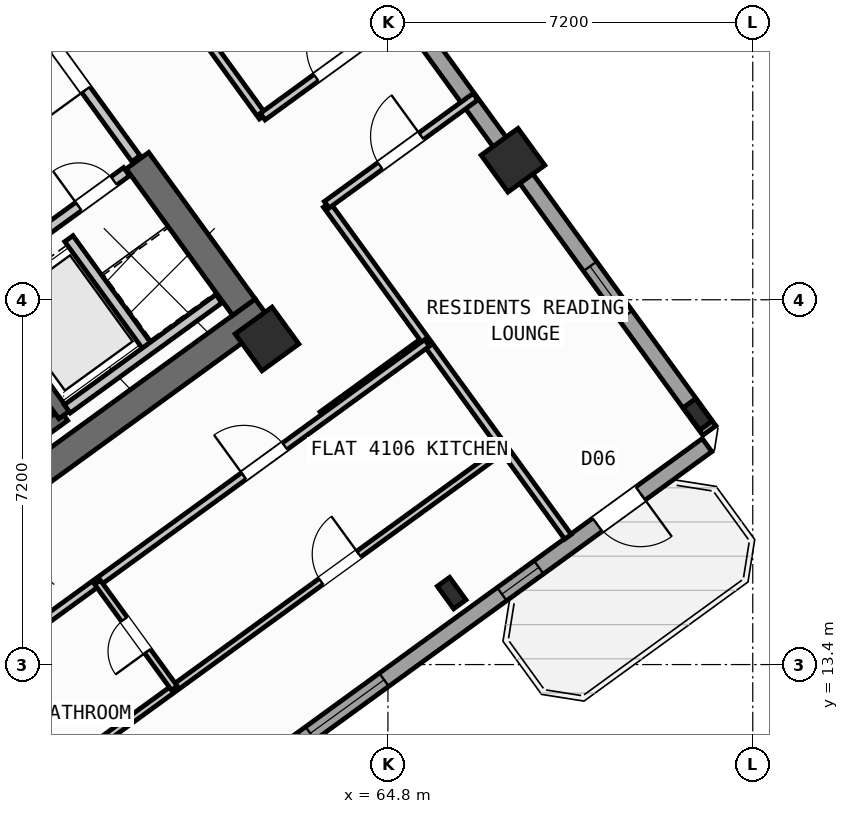
"""IFC4 building model, lengths in metres.
Left out: names, types, materials, properties, quantities, classifications, styles, units other than length and angle.
Written with IfcOpenShell. Run it as: python <this file> out.ifc"""

import sys

from ifc_helpers import new_model, si_unit, direction, frame, frame_2d, origin, origin_2d, place, context, subcontext, project, spatial, rectangle, hollow_rectangle, i_section, extrude, source, transform, mapped, element, fill, save


model = new_model("IFC4")
c1 = context("Model", 3, precision=1e-05, world=origin(), true_north=direction((0.0, 1.0)))
c2 = subcontext(c1, "Body", "Model", "MODEL_VIEW")
j1 = project(units=[si_unit("LENGTHUNIT", "METRE"), si_unit("PLANEANGLEUNIT", "RADIAN")], contexts=[c1])
p1 = place(None, origin())
s1 = spatial("IfcSite", under=j1, at=p1, CompositionType="ELEMENT")
p2 = place(p1, origin())
s2 = spatial("IfcBuilding", under=s1, at=p2, CompositionType="ELEMENT")
p3 = place(p2, frame((0.0, 0.0, 162.3)))
s3 = spatial("IfcBuildingStorey", under=s2, at=p3, CompositionType="ELEMENT", Elevation=162.3)
p4 = place(p3, frame((52.359, 13.14, 0.0), z_axis=(0.0, 0.0, 1.0), x_axis=(0.809014896919, 0.587788139183, 0.0)))
e1 = element("IfcWall", 1, at=p4, inside=s3, PredefinedType="SHEAR", context=c2, shape_type="SweptSolid", body=[
    extrude(rectangle(XDim=12.34, YDim=0.55, at=frame_2d((6.17, 0.0))), origin(), (0.0, 0.0, 1.0), 3.35),
])
p5 = place(p3, frame((61.958, 20.454, 0.0), z_axis=(0.0, 0.0, 1.0), x_axis=(-0.587802113096, 0.809004744015, 0.0)))
e2 = element("IfcWall", 2, at=p5, inside=s3, PredefinedType="SHEAR", context=c2, shape_type="SweptSolid", body=[
    extrude(rectangle(XDim=3.575, YDim=0.55, at=frame_2d((1.788, 0.0))), origin(), (0.0, 0.0, 1.0), 3.35),
])
m1 = source(origin(), c2, "Body", "SweptSolid", [
    extrude(i_section(OverallWidth=0.3, OverallDepth=0.55, WebThickness=0.015, FlangeThickness=0.029, at=origin_2d()), origin(), (0.0, 0.0, 1.0), 3.6),
])
p6 = place(p3, frame((66.058, 14.811, 0.0), z_axis=(0.0, 0.0, 1.0), x_axis=(0.809016994375, 0.587785252292, 0.0)))
e3 = element("IfcColumn", 3, at=p6, inside=s3, PredefinedType="COLUMN", context=c2, shape_type="MappedRepresentation", body=[
    mapped(m1, transform((0.0, 0.0, 0.0), scale=1.0)),
])
m2 = source(origin(), c2, "Body", "SweptSolid", [
    extrude(hollow_rectangle(XDim=0.9, YDim=0.9, WallThickness=0.036, at=origin_2d()), origin(), (0.0, 0.0, 1.0), 3.6),
])
p7 = place(p3, frame((62.414, 19.827, 0.0), z_axis=(0.0, 0.0, 1.0), x_axis=(0.809016994375, 0.587785252292, 0.0)))
e4 = element("IfcColumn", 4, at=p7, inside=s3, PredefinedType="COLUMN", context=c2, shape_type="MappedRepresentation", body=[
    mapped(m2, transform((0.0, 0.0, 0.0), scale=1.0)),
])
p8 = place(p3, frame((70.912, 18.338, 0.0), z_axis=(0.0, 0.0, 1.0), x_axis=(0.809016994375, 0.587785252292, 0.0)))
e5 = element("IfcColumn", 5, at=p8, inside=s3, PredefinedType="COLUMN", context=c2, shape_type="MappedRepresentation", body=[
    mapped(m1, transform((0.0, 0.0, 0.0), scale=1.0)),
])
p9 = place(p3, frame((67.268, 23.354, 0.0), z_axis=(0.0, 0.0, 1.0), x_axis=(0.809016994375, 0.587785252292, 0.0)))
e6 = element("IfcColumn", 6, at=p9, inside=s3, PredefinedType="COLUMN", context=c2, shape_type="MappedRepresentation", body=[
    mapped(m2, transform((0.0, 0.0, 0.0), scale=1.0)),
])
p10 = place(p3, frame((43.938, 25.192, 0.0), z_axis=(0.0, 0.0, 1.0), x_axis=(0.809016324578, 0.587786174187, 0.0)))
e7 = element("IfcWall", 7, at=p10, inside=s3, PredefinedType="STANDARD", context=c2, shape_type="SweptSolid", body=[
    extrude(rectangle(XDim=17.587, YDim=0.32, at=frame_2d((8.794, 0.0))), origin(), (0.0, 0.0, 1.0), 3.35),
])
p11 = place(p10, frame((14.914, 0.0, 0.0)))
e8 = element("IfcOpeningElement", 8, at=p11, cuts=e7, PredefinedType="OPENING", context=c2, shape_type="SweptSolid", body=[
    extrude(rectangle(XDim=1.05, YDim=2.15, at=frame_2d((0.525, 1.075))), frame((0.0, 0.17, 0.0), z_axis=(0.0, -1.0, 0.0), x_axis=(1.0, 0.0, 0.0)), (0.0, 0.0, 1.0), 0.34),
])
p12 = place(p10, frame((2.144, 0.0, 0.8)))
e9 = element("IfcOpeningElement", 9, at=p12, cuts=e7, PredefinedType="OPENING", context=c2, shape_type="SweptSolid", body=[
    extrude(rectangle(XDim=2.1, YDim=1.55, at=frame_2d((1.05, 0.775))), frame((0.0, 0.17, 0.0), z_axis=(0.0, -1.0, 0.0), x_axis=(1.0, 0.0, 0.0)), (0.0, 0.0, 1.0), 0.34),
])
p13 = place(p10, frame((7.344, 0.0, 0.8)))
e10 = element("IfcOpeningElement", 10, at=p13, cuts=e7, PredefinedType="OPENING", context=c2, shape_type="SweptSolid", body=[
    extrude(rectangle(XDim=2.1, YDim=1.55, at=frame_2d((1.05, 0.775))), frame((0.0, 0.17, 0.0), z_axis=(0.0, -1.0, 0.0), x_axis=(1.0, 0.0, 0.0)), (0.0, 0.0, 1.0), 0.34),
])
p14 = place(p3, frame((58.455, 35.484, 0.0), z_axis=(0.0, 0.0, 1.0), x_axis=(0.587783625747, -0.809018176127, 0.0)))
e11 = element("IfcWall", 11, at=p14, inside=s3, PredefinedType="STANDARD", context=c2, shape_type="SweptSolid", body=[
    extrude(rectangle(XDim=21.587, YDim=0.32, at=frame_2d((10.794, 0.0))), origin(), (0.0, 0.0, 1.0), 2.775),
])
p15 = place(p14, frame((1.475, 0.0, 0.8)))
e12 = element("IfcOpeningElement", 12, at=p15, cuts=e11, PredefinedType="OPENING", context=c2, shape_type="SweptSolid", body=[
    extrude(rectangle(XDim=2.1, YDim=1.55, at=frame_2d((1.05, 0.775))), frame((0.0, 0.17, 0.0), z_axis=(0.0, -1.0, 0.0), x_axis=(1.0, 0.0, 0.0)), (0.0, 0.0, 1.0), 0.34),
])
p16 = place(p14, frame((5.13, 0.0, 0.85)))
e13 = element("IfcOpeningElement", 13, at=p16, cuts=e11, PredefinedType="OPENING", context=c2, shape_type="SweptSolid", body=[
    extrude(rectangle(XDim=1.5, YDim=1.5, at=frame_2d((0.75, 0.75))), frame((0.0, 0.17, 0.0), z_axis=(0.0, -1.0, 0.0), x_axis=(1.0, 0.0, 0.0)), (0.0, 0.0, 1.0), 0.34),
])
p17 = place(p14, frame((8.929, 0.0, 0.85)))
e14 = element("IfcOpeningElement", 14, at=p17, cuts=e11, PredefinedType="OPENING", context=c2, shape_type="SweptSolid", body=[
    extrude(rectangle(XDim=1.5, YDim=1.5, at=frame_2d((0.75, 0.75))), frame((0.0, 0.17, 0.0), z_axis=(0.0, -1.0, 0.0), x_axis=(1.0, 0.0, 0.0)), (0.0, 0.0, 1.0), 0.34),
])
p18 = place(p14, frame((17.581, 0.0, 0.95)))
e15 = element("IfcOpeningElement", 15, at=p18, cuts=e11, PredefinedType="OPENING", context=c2, shape_type="SweptSolid", body=[
    extrude(rectangle(XDim=1.2, YDim=1.4, at=frame_2d((0.6, 0.7))), frame((0.0, 0.17, 0.0), z_axis=(0.0, -1.0, 0.0), x_axis=(1.0, 0.0, 0.0)), (0.0, 0.0, 1.0), 0.34),
])
p19 = place(p3, frame((71.098, 17.731, 0.0), z_axis=(0.0, 0.0, 1.0), x_axis=(-0.809021120468, -0.587779573171, 0.0)))
e16 = element("IfcWall", 16, at=p19, inside=s3, PredefinedType="STANDARD", context=c2, shape_type="SweptSolid", body=[
    extrude(rectangle(XDim=17.588, YDim=0.32, at=frame_2d((8.794, 0.0))), origin(), (0.0, 0.0, 1.0), 3.35),
])
p20 = place(p19, frame((1.624, 0.0, 0.0)))
e17 = element("IfcOpeningElement", 17, at=p20, cuts=e16, PredefinedType="OPENING", context=c2, shape_type="SweptSolid", body=[
    extrude(rectangle(XDim=1.05, YDim=2.15, at=frame_2d((0.525, 1.075))), frame((0.0, 0.17, 0.0), z_axis=(0.0, -1.0, 0.0), x_axis=(1.0, 0.0, 0.0)), (0.0, 0.0, 1.0), 0.34),
])
p21 = place(p19, frame((4.104, 0.0, 1.0)))
e18 = element("IfcOpeningElement", 18, at=p21, cuts=e16, PredefinedType="OPENING", context=c2, shape_type="SweptSolid", body=[
    extrude(rectangle(XDim=0.9, YDim=1.25, at=frame_2d((0.45, 0.625))), frame((0.0, 0.17, 0.0), z_axis=(0.0, -1.0, 0.0), x_axis=(1.0, 0.0, 0.0)), (0.0, 0.0, 1.0), 0.34),
])
p22 = place(p19, frame((7.879, 0.0, 0.85)))
e19 = element("IfcOpeningElement", 19, at=p22, cuts=e16, PredefinedType="OPENING", context=c2, shape_type="SweptSolid", body=[
    extrude(rectangle(XDim=1.8, YDim=1.5, at=frame_2d((0.9, 0.75))), frame((0.0, 0.17, 0.0), z_axis=(0.0, -1.0, 0.0), x_axis=(1.0, 0.0, 0.0)), (0.0, 0.0, 1.0), 0.34),
])
p23 = place(p19, frame((12.849, 0.0, 0.85)))
e20 = element("IfcOpeningElement", 20, at=p23, cuts=e16, PredefinedType="OPENING", context=c2, shape_type="SweptSolid", body=[
    extrude(rectangle(XDim=1.8, YDim=1.5, at=frame_2d((0.9, 0.75))), frame((0.0, 0.17, 0.0), z_axis=(0.0, -1.0, 0.0), x_axis=(1.0, 0.0, 0.0)), (0.0, 0.0, 1.0), 0.34),
])
p24 = place(p3, frame((52.472, 14.013, 0.0), z_axis=(0.0, 0.0, 1.0), x_axis=(0.809028366311, 0.587769599847, 0.0)))
e21 = element("IfcWall", 21, at=p24, inside=s3, PredefinedType="SHEAR", context=c2, shape_type="SweptSolid", body=[
    extrude(rectangle(XDim=7.33, YDim=0.26, at=frame_2d((3.665, 0.0))), origin(), (0.0, 0.0, 1.0), 3.35),
])
p25 = place(p3, frame((58.41, 18.327, 0.0), z_axis=(0.0, 0.0, 1.0), x_axis=(-0.58776738483, 0.809029975545, 0.0)))
e22 = element("IfcWall", 22, at=p25, inside=s3, PredefinedType="SHEAR", context=c2, shape_type="SweptSolid", body=[
    extrude(rectangle(XDim=3.16, YDim=0.26, at=frame_2d((1.58, 0.0))), origin(), (0.0, 0.0, 1.0), 3.35),
])
p26 = place(p3, frame((56.553, 20.884, 0.0), z_axis=(0.0, 0.0, 1.0), x_axis=(0.809023564264, 0.58777620951, 0.0)))
e23 = element("IfcWall", 23, at=p26, inside=s3, PredefinedType="STANDARD", context=c2, shape_type="SweptSolid", body=[
    extrude(rectangle(XDim=3.818, YDim=0.2, at=frame_2d((1.909, 0.0))), origin(), (0.0, 0.0, 1.0), 3.34),
])
p27 = place(p26, frame((0.57, 0.0, 0.0)))
e24 = element("IfcOpeningElement", 24, at=p27, cuts=e23, PredefinedType="OPENING", context=c2, shape_type="SweptSolid", body=[
    extrude(rectangle(XDim=1.1, YDim=2.15, at=frame_2d((0.55, 1.075))), frame((0.0, 0.11, 0.0), z_axis=(0.0, -1.0, 0.0), x_axis=(1.0, 0.0, 0.0)), (0.0, 0.0, 1.0), 0.22),
])
p28 = place(p26, frame((2.65, 0.0, 0.0)))
e25 = element("IfcOpeningElement", 25, at=p28, cuts=e23, PredefinedType="OPENING", context=c2, shape_type="SweptSolid", body=[
    extrude(rectangle(XDim=0.86, YDim=2.05, at=frame_2d((0.43, 1.025))), frame((0.0, 0.11, 0.0), z_axis=(0.0, -1.0, 0.0), x_axis=(1.0, 0.0, 0.0)), (0.0, 0.0, 1.0), 0.22),
])
p29 = place(p3, frame((60.067, 19.655, 0.0), z_axis=(0.0, 0.0, 1.0), x_axis=(-0.587800520745, 0.809005900975, 0.0)))
e26 = element("IfcWall", 26, at=p29, inside=s3, PredefinedType="STANDARD", context=c2, shape_type="SweptSolid", body=[
    extrude(rectangle(XDim=2.66, YDim=0.2, at=frame_2d((1.33, 0.0))), origin(), (0.0, 0.0, 1.0), 3.34),
])
p30 = place(p3, frame((58.472, 18.447, 0.0), z_axis=(0.0, 0.0, 1.0), x_axis=(0.809018631237, 0.587782999339, 0.0)))
e27 = element("IfcWall", 27, at=p30, inside=s3, PredefinedType="STANDARD", context=c2, shape_type="SweptSolid", body=[
    extrude(rectangle(XDim=3.698, YDim=0.2, at=frame_2d((1.849, 0.0))), origin(), (0.0, 0.0, 1.0), 3.34),
])
p31 = place(p3, frame((59.827, 23.386, 0.0), z_axis=(0.0, 0.0, 1.0), x_axis=(-0.587803840107, 0.809003489211, 0.0)))
e28 = element("IfcWall", 28, at=p31, inside=s3, PredefinedType="STANDARD", context=c2, shape_type="SweptSolid", body=[
    extrude(rectangle(XDim=2.96, YDim=0.2, at=frame_2d((1.48, 0.0))), origin(), (0.0, 0.0, 1.0), 3.34),
])
p32 = place(p31, frame((1.68, 0.0, 0.0)))
e29 = element("IfcOpeningElement", 29, at=p32, cuts=e28, PredefinedType="OPENING", context=c2, shape_type="SweptSolid", body=[
    extrude(rectangle(XDim=1.0, YDim=2.1, at=frame_2d((0.5, 1.05))), frame((0.0, 0.11, 0.0), z_axis=(0.0, -1.0, 0.0), x_axis=(1.0, 0.0, 0.0)), (0.0, 0.0, 1.0), 0.22),
])
p33 = place(p3, frame((63.507, 18.322, 0.0), z_axis=(0.0, 0.0, 1.0), x_axis=(0.809034604122, 0.587761013791, 0.0)))
e30 = element("IfcWall", 30, at=p33, inside=s3, PredefinedType="PARTITIONING", context=c2, shape_type="SweptSolid", body=[
    extrude(rectangle(XDim=2.51, YDim=0.16, at=frame_2d((1.255, 0.0))), origin(), (0.0, 0.0, 1.0), 3.34),
])
p34 = place(p3, frame((68.353, 15.922, 0.0), z_axis=(0.0, 0.0, 1.0), x_axis=(-0.58776839458, 0.809029241952, 0.0)))
e31 = element("IfcWall", 31, at=p34, inside=s3, PredefinedType="PARTITIONING", context=c2, shape_type="SweptSolid", body=[
    extrude(rectangle(XDim=8.1, YDim=0.16, at=frame_2d((4.05, 0.0))), origin(), (0.0, 0.0, 1.0), 3.34),
])
p35 = place(p3, frame((62.328, 24.215, 0.0), z_axis=(0.0, 0.0, 1.0), x_axis=(-0.587778600963, 0.809021826807, 0.0)))
e32 = element("IfcWall", 32, at=p35, inside=s3, PredefinedType="PARTITIONING", context=c2, shape_type="SweptSolid", body=[
    extrude(rectangle(XDim=11.45, YDim=0.16, at=frame_2d((5.725, 0.0))), origin(), (0.0, 0.0, 1.0), 3.34),
])
p36 = place(p3, frame((63.592, 22.475, 0.0), z_axis=(0.0, 0.0, 1.0), x_axis=(0.809035546126, 0.58775971715, 0.0)))
e33 = element("IfcWall", 33, at=p36, inside=s3, PredefinedType="PARTITIONING", context=c2, shape_type="SweptSolid", body=[
    extrude(rectangle(XDim=3.63, YDim=0.16, at=frame_2d((1.815, 0.0))), origin(), (0.0, 0.0, 1.0), 3.34),
])
p37 = place(p36, frame((1.305, 0.0, 0.0)))
e34 = element("IfcOpeningElement", 34, at=p37, cuts=e33, PredefinedType="OPENING", context=c2, shape_type="SweptSolid", body=[
    extrude(rectangle(XDim=1.0, YDim=2.1, at=frame_2d((0.5, 1.05))), frame((0.0, 0.09, 0.0), z_axis=(0.0, -1.0, 0.0), x_axis=(1.0, 0.0, 0.0)), (0.0, 0.0, 1.0), 0.18),
])
p38 = place(p3, frame((62.328, 24.215, 0.0), z_axis=(0.0, 0.0, 1.0), x_axis=(0.809003564202, 0.587803736896, 0.0)))
e35 = element("IfcWall", 35, at=p38, inside=s3, PredefinedType="PARTITIONING", context=c2, shape_type="SweptSolid", body=[
    extrude(rectangle(XDim=3.63, YDim=0.16, at=frame_2d((1.815, 0.0))), origin(), (0.0, 0.0, 1.0), 3.34),
])
p39 = place(p38, frame((1.305, 0.0, 0.0)))
e36 = element("IfcOpeningElement", 36, at=p39, cuts=e35, PredefinedType="OPENING", context=c2, shape_type="SweptSolid", body=[
    extrude(rectangle(XDim=1.0, YDim=2.1, at=frame_2d((0.5, 1.05))), frame((0.0, 0.09, 0.0), z_axis=(0.0, -1.0, 0.0), x_axis=(1.0, 0.0, 0.0)), (0.0, 0.0, 1.0), 0.18),
])
p40 = place(p3, frame((53.705, 11.126, 0.0), z_axis=(0.0, 0.0, 1.0), x_axis=(0.809014504436, 0.587788679384, 0.0)))
e37 = element("IfcWall", 37, at=p40, inside=s3, PredefinedType="PARTITIONING", context=c2, shape_type="SweptSolid", body=[
    extrude(rectangle(XDim=14.67, YDim=0.16, at=frame_2d((7.335, 0.0))), origin(), (0.0, 0.0, 1.0), 3.34),
])
p41 = place(p40, frame((10.2, 0.0, 0.0)))
e38 = element("IfcOpeningElement", 38, at=p41, cuts=e37, PredefinedType="OPENING", context=c2, shape_type="SweptSolid", body=[
    extrude(rectangle(XDim=1.0, YDim=2.1, at=frame_2d((0.5, 1.05))), frame((0.0, 0.09, 0.0), z_axis=(0.0, -1.0, 0.0), x_axis=(1.0, 0.0, 0.0)), (0.0, 0.0, 1.0), 0.18),
])
p42 = place(p3, frame((56.249, 9.785, 0.0), z_axis=(0.0, 0.0, 1.0), x_axis=(0.809011747655, 0.587792473715, 0.0)))
e39 = element("IfcWall", 39, at=p42, inside=s3, PredefinedType="PLUMBINGWALL", context=c2, shape_type="SweptSolid", body=[
    extrude(rectangle(XDim=13.4, YDim=0.14, at=frame_2d((6.7, 0.0))), origin(), (0.0, 0.0, 1.0), 3.34),
])
p43 = place(p42, frame((8.94, 0.0, 0.0)))
e40 = element("IfcOpeningElement", 40, at=p43, cuts=e39, PredefinedType="OPENING", context=c2, shape_type="SweptSolid", body=[
    extrude(rectangle(XDim=0.92, YDim=2.08, at=frame_2d((0.46, 1.04))), frame((0.0, 0.08, 0.0), z_axis=(0.0, -1.0, 0.0), x_axis=(1.0, 0.0, 0.0)), (0.0, 0.0, 1.0), 0.16),
])
p44 = place(p3, frame((60.585, 12.936, 0.0), z_axis=(0.0, 0.0, 1.0), x_axis=(-0.587772116736, 0.809026537752, 0.0)))
e41 = element("IfcWall", 41, at=p44, inside=s3, PredefinedType="PLUMBINGWALL", context=c2, shape_type="SweptSolid", body=[
    extrude(rectangle(XDim=2.58, YDim=0.14, at=frame_2d((1.29, 0.0))), origin(), (0.0, 0.0, 1.0), 3.34),
])
p45 = place(p44, frame((0.9, 0.0, 0.0)))
e42 = element("IfcOpeningElement", 42, at=p45, cuts=e41, PredefinedType="OPENING", context=c2, shape_type="SweptSolid", body=[
    extrude(rectangle(XDim=0.78, YDim=2.05, at=frame_2d((0.39, 1.025))), frame((0.0, 0.08, 0.0), z_axis=(0.0, -1.0, 0.0), x_axis=(1.0, 0.0, 0.0)), (0.0, 0.0, 1.0), 0.16),
])
m3 = source(origin(), c2, "Body", "SweptSolid", [
    extrude(rectangle(XDim=1.05, YDim=2.15, at=frame_2d((0.525, 1.075))), frame((0.0, 0.025, 0.0), z_axis=(0.0, -1.0, 0.0), x_axis=(1.0, 0.0, 0.0)), (0.0, 0.0, 1.0), 0.05),
])
p46 = place(p20, origin())
e43 = element("IfcDoor", 43, at=p46, inside=s3, OperationType="SINGLE_SWING_LEFT", PredefinedType="DOOR", context=c2, shape_type="MappedRepresentation", body=[
    mapped(m3, transform((0.0, 0.0, 0.0), scale=1.0)),
])
fill(e17, e43)
m4 = source(origin(), c2, "Body", "SweptSolid", [
    extrude(rectangle(XDim=1.2, YDim=1.4, at=frame_2d((0.6, 0.7))), frame((0.0, 0.03, 0.0), z_axis=(0.0, -1.0, 0.0), x_axis=(1.0, 0.0, 0.0)), (0.0, 0.0, 1.0), 0.06),
])
p47 = place(p18, origin())
e44 = element("IfcWindow", 44, at=p47, inside=s3, PartitioningType="SINGLE_PANEL", PredefinedType="WINDOW", context=c2, shape_type="MappedRepresentation", body=[
    mapped(m4, transform((0.0, 0.0, 0.0), scale=1.0)),
])
fill(e15, e44)
m5 = source(origin(), c2, "Body", "SweptSolid", [
    extrude(rectangle(XDim=0.9, YDim=1.25, at=frame_2d((0.45, 0.625))), frame((0.0, 0.03, 0.0), z_axis=(0.0, -1.0, 0.0), x_axis=(1.0, 0.0, 0.0)), (0.0, 0.0, 1.0), 0.06),
])
p48 = place(p21, origin())
e45 = element("IfcWindow", 45, at=p48, inside=s3, PartitioningType="SINGLE_PANEL", PredefinedType="WINDOW", context=c2, shape_type="MappedRepresentation", body=[
    mapped(m5, transform((0.0, 0.0, 0.0), scale=1.0)),
])
fill(e18, e45)
m6 = source(origin(), c2, "Body", "SweptSolid", [
    extrude(rectangle(XDim=1.8, YDim=1.5, at=frame_2d((0.9, 0.75))), frame((0.0, 0.03, 0.0), z_axis=(0.0, -1.0, 0.0), x_axis=(1.0, 0.0, 0.0)), (0.0, 0.0, 1.0), 0.06),
])
p49 = place(p22, origin())
e46 = element("IfcWindow", 46, at=p49, inside=s3, PartitioningType="SINGLE_PANEL", PredefinedType="WINDOW", context=c2, shape_type="MappedRepresentation", body=[
    mapped(m6, transform((0.0, 0.0, 0.0), scale=1.0)),
])
fill(e19, e46)
m7 = source(origin(), c2, "Body", "SweptSolid", [
    extrude(rectangle(XDim=0.86, YDim=2.05, at=frame_2d((0.43, 1.025))), frame((0.0, 0.025, 0.0), z_axis=(0.0, -1.0, 0.0), x_axis=(1.0, 0.0, 0.0)), (0.0, 0.0, 1.0), 0.05),
])
p50 = place(p28, origin())
e47 = element("IfcDoor", 47, at=p50, inside=s3, OperationType="SINGLE_SWING_LEFT", PredefinedType="DOOR", context=c2, shape_type="MappedRepresentation", body=[
    mapped(m7, transform((0.0, 0.0, 0.0), scale=1.0)),
])
fill(e25, e47)
m8 = source(origin(), c2, "Body", "SweptSolid", [
    extrude(rectangle(XDim=1.0, YDim=2.1, at=frame_2d((0.5, 1.05))), frame((0.0, 0.025, 0.0), z_axis=(0.0, -1.0, 0.0), x_axis=(1.0, 0.0, 0.0)), (0.0, 0.0, 1.0), 0.05),
])
p51 = place(p32, origin())
e48 = element("IfcDoor", 48, at=p51, inside=s3, OperationType="SINGLE_SWING_LEFT", PredefinedType="DOOR", context=c2, shape_type="MappedRepresentation", body=[
    mapped(m8, transform((0.0, 0.0, 0.0), scale=1.0)),
])
fill(e29, e48)
p52 = place(p39, origin())
e49 = element("IfcDoor", 49, at=p52, inside=s3, OperationType="SINGLE_SWING_RIGHT", PredefinedType="DOOR", context=c2, shape_type="MappedRepresentation", body=[
    mapped(m8, transform((0.0, 0.0, 0.0), scale=1.0)),
])
fill(e36, e49)
p53 = place(p37, origin())
e50 = element("IfcDoor", 50, at=p53, inside=s3, OperationType="SINGLE_SWING_RIGHT", PredefinedType="DOOR", context=c2, shape_type="MappedRepresentation", body=[
    mapped(m8, transform((0.0, 0.0, 0.0), scale=1.0)),
])
fill(e34, e50)
p54 = place(p41, origin())
e51 = element("IfcDoor", 51, at=p54, inside=s3, OperationType="SINGLE_SWING_LEFT", PredefinedType="DOOR", context=c2, shape_type="MappedRepresentation", body=[
    mapped(m8, transform((0.0, 0.0, 0.0), scale=1.0)),
])
fill(e38, e51)
m9 = source(origin(), c2, "Body", "SweptSolid", [
    extrude(rectangle(XDim=0.92, YDim=2.08, at=frame_2d((0.46, 1.04))), frame((0.0, 0.025, 0.0), z_axis=(0.0, -1.0, 0.0), x_axis=(1.0, 0.0, 0.0)), (0.0, 0.0, 1.0), 0.05),
])
p55 = place(p43, origin())
e52 = element("IfcDoor", 52, at=p55, inside=s3, OperationType="SINGLE_SWING_RIGHT", PredefinedType="DOOR", context=c2, shape_type="MappedRepresentation", body=[
    mapped(m9, transform((0.0, 0.0, 0.0), scale=1.0)),
])
fill(e40, e52)
m10 = source(origin(), c2, "Body", "SweptSolid", [
    extrude(rectangle(XDim=0.78, YDim=2.05, at=frame_2d((0.39, 1.025))), frame((0.0, 0.025, 0.0), z_axis=(0.0, -1.0, 0.0), x_axis=(1.0, 0.0, 0.0)), (0.0, 0.0, 1.0), 0.05),
])
p56 = place(p45, origin())
e53 = element("IfcDoor", 53, at=p56, inside=s3, OperationType="SINGLE_SWING_LEFT", PredefinedType="DOOR", context=c2, shape_type="MappedRepresentation", body=[
    mapped(m10, transform((0.0, 0.0, 0.0), scale=1.0)),
])
fill(e42, e53)
save(model, sys.argv[1])
